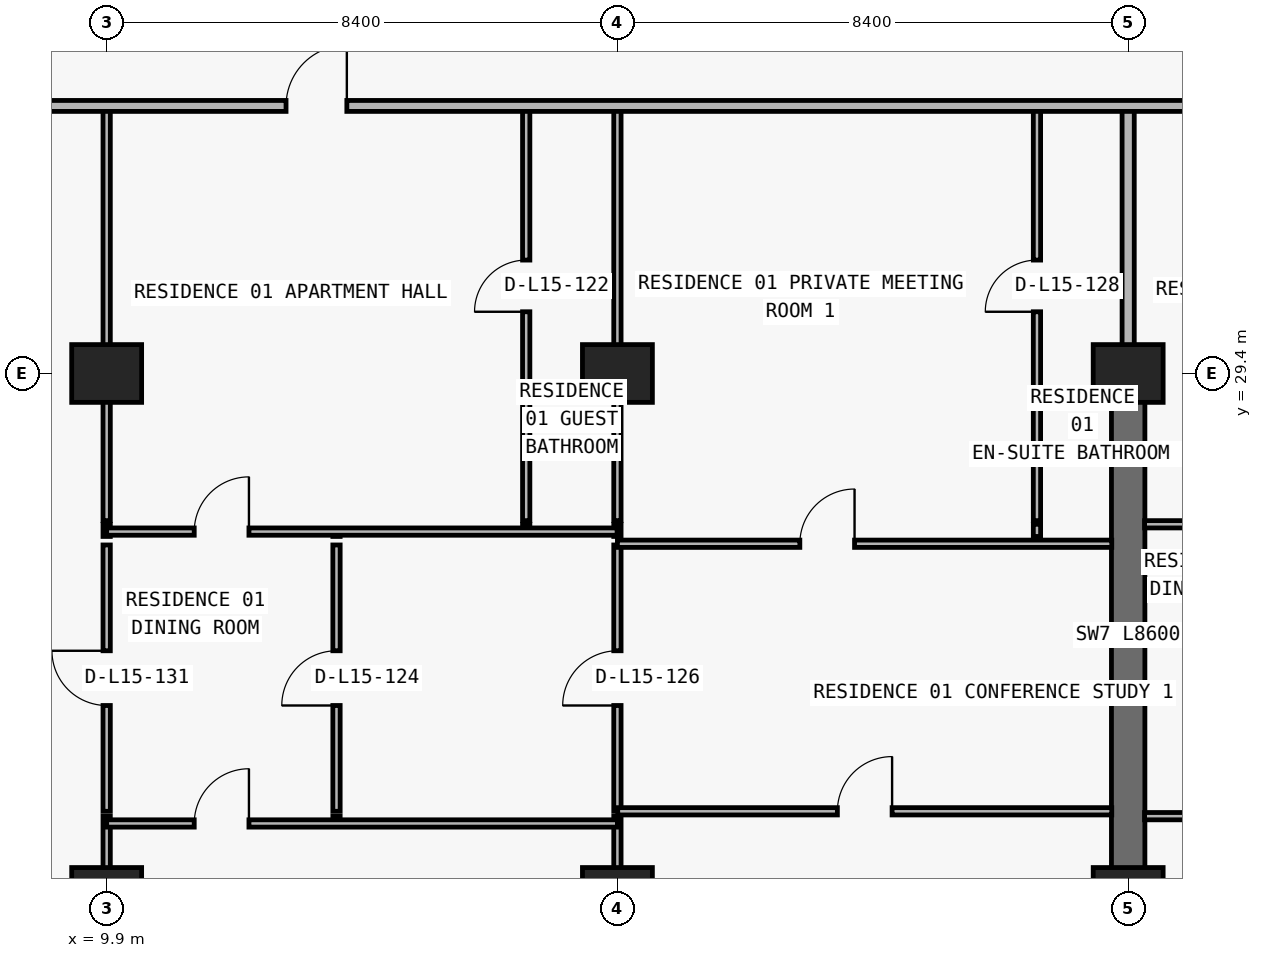
"""IFC4 building model, lengths in metres.
Left out: names, types, materials, properties, quantities, classifications, styles, units other than length and angle.
Written with IfcOpenShell. Run it as: python <this file> out.ifc"""

import sys

from ifc_helpers import new_model, si_unit, direction, frame, frame_2d, origin, origin_2d, place, context, subcontext, project, spatial, rectangle, extrude, element, fill, save


model = new_model("IFC4")
c1 = context("Model", 3, precision=1e-05, world=origin(), true_north=direction((0.0, 1.0)))
c2 = subcontext(c1, "Body", "Model", "MODEL_VIEW")
j1 = project(units=[si_unit("LENGTHUNIT", "METRE"), si_unit("PLANEANGLEUNIT", "RADIAN")], contexts=[c1])
p1 = place(None, origin())
s1 = spatial("IfcSite", under=j1, at=p1, CompositionType="ELEMENT")
p2 = place(p1, origin())
s2 = spatial("IfcBuilding", under=s1, at=p2, CompositionType="ELEMENT")
p3 = place(p2, frame((0.0, 0.0, 59.7)))
s3 = spatial("IfcBuildingStorey", under=s2, at=p3, CompositionType="ELEMENT", Elevation=59.7)
for number, where, z_axis, x_axis in (
    (1, (9.9, 20.8, 0.0), (0.0, 0.0, 1.0), (1.0, 0.0, 0.0)),
    (2, (18.3, 20.8, 0.0), (0.0, 0.0, 1.0), (1.0, 0.0, 0.0)),
    (3, (26.7, 20.8, 0.0), (0.0, 0.0, 1.0), (1.0, 0.0, 0.0)),
    (4, (9.9, 29.4, 0.0), (0.0, 0.0, 1.0), (1.0, 0.0, 0.0)),
    (5, (18.3, 29.4, 0.0), (0.0, 0.0, 1.0), (1.0, 0.0, 0.0)),
    (6, (26.7, 29.4, 0.0), (0.0, 0.0, 1.0), (1.0, 0.0, 0.0)),
):
    element("IfcColumn", number, at=place(p3, frame(where, z_axis=z_axis, x_axis=x_axis)), inside=s3, PredefinedType="COLUMN", context=c2, shape_type="SweptSolid", body=[
        extrude(rectangle(XDim=1.15, YDim=0.95, at=origin_2d()), origin(), (0.0, 0.0, 1.0), 3.05),
    ])
p4 = place(p3, frame((26.7, 20.8, 0.0), z_axis=(0.0, 0.0, 1.0), x_axis=(0.0, 1.0, 0.0)))
e7 = element("IfcWall", 7, at=p4, inside=s3, PredefinedType="SHEAR", context=c2, shape_type="SweptSolid", body=[
    extrude(rectangle(XDim=8.6, YDim=0.55, at=frame_2d((4.3, 0.0))), origin(), (0.0, 0.0, 1.0), 3.05),
])
p5 = place(p3, frame((9.9, 6.24, 0.0), z_axis=(0.0, 0.0, 1.0), x_axis=(0.0, 1.0, 0.0)))
e8 = element("IfcWall", 8, at=p5, inside=s3, PredefinedType="PARTITIONING", context=c2, shape_type="SweptSolid", body=[
    extrude(rectangle(XDim=15.88, YDim=0.12, at=frame_2d((7.94, 0.0))), origin(), (0.0, 0.0, 1.0), 2.11),
])
p6 = place(p3, frame((9.9, 22.2, 0.0), z_axis=(0.0, 0.0, 1.0), x_axis=(0.0, 1.0, 0.0)))
e9 = element("IfcWall", 9, at=p6, inside=s3, PredefinedType="PARTITIONING", context=c2, shape_type="SweptSolid", body=[
    extrude(rectangle(XDim=4.38, YDim=0.12, at=frame_2d((2.19, 0.0))), origin(), (0.0, 0.0, 1.0), 2.11),
])
p7 = place(p6, frame((1.74, 0.0, 0.0)))
e10 = element("IfcOpeningElement", 10, at=p7, cuts=e9, PredefinedType="OPENING", context=c2, shape_type="SweptSolid", body=[
    extrude(rectangle(XDim=0.9, YDim=2.06, at=frame_2d((0.45, 1.03))), frame((0.0, 0.07, 0.0), z_axis=(0.0, -1.0, 0.0), x_axis=(1.0, 0.0, 0.0)), (0.0, 0.0, 1.0), 0.14),
])
p8 = place(p3, frame((9.9, 26.72, 0.0), z_axis=(0.0, 0.0, 1.0), x_axis=(0.0, 1.0, 0.0)))
e11 = element("IfcWall", 11, at=p8, inside=s3, PredefinedType="PARTITIONING", context=c2, shape_type="SweptSolid", body=[
    extrude(rectangle(XDim=0.2, YDim=0.12, at=frame_2d((0.1, 0.0))), origin(), (0.0, 0.0, 1.0), 2.11),
])
p9 = place(p3, frame((9.9, 26.98, 0.0), z_axis=(0.0, 0.0, 1.0), x_axis=(0.0, 1.0, 0.0)))
e12 = element("IfcWall", 12, at=p9, inside=s3, PredefinedType="PARTITIONING", context=c2, shape_type="SweptSolid", body=[
    extrude(rectangle(XDim=6.82, YDim=0.12, at=frame_2d((3.41, 0.0))), origin(), (0.0, 0.0, 1.0), 2.11),
])
p10 = place(p3, frame((13.68, 22.0, 0.0), z_axis=(0.0, 0.0, 1.0), x_axis=(0.0, 1.0, 0.0)))
e13 = element("IfcWall", 13, at=p10, inside=s3, PredefinedType="PARTITIONING", context=c2, shape_type="SweptSolid", body=[
    extrude(rectangle(XDim=0.12, YDim=0.12, at=frame_2d((0.06, 0.0))), origin(), (0.0, 0.0, 1.0), 3.05),
])
p11 = place(p3, frame((13.68, 22.2, 0.0), z_axis=(0.0, 0.0, 1.0), x_axis=(0.0, 1.0, 0.0)))
e14 = element("IfcWall", 14, at=p11, inside=s3, PredefinedType="PARTITIONING", context=c2, shape_type="SweptSolid", body=[
    extrude(rectangle(XDim=4.38, YDim=0.12, at=frame_2d((2.19, 0.0))), origin(), (0.0, 0.0, 1.0), 3.05),
])
p12 = place(p11, frame((1.74, 0.0, 0.0)))
e15 = element("IfcOpeningElement", 15, at=p12, cuts=e14, PredefinedType="OPENING", context=c2, shape_type="SweptSolid", body=[
    extrude(rectangle(XDim=0.9, YDim=2.15, at=frame_2d((0.45, 1.075))), frame((0.0, 0.07, 0.0), z_axis=(0.0, -1.0, 0.0), x_axis=(1.0, 0.0, 0.0)), (0.0, 0.0, 1.0), 0.14),
])
p13 = place(p3, frame((13.68, 26.72, 0.0), z_axis=(0.0, 0.0, 1.0), x_axis=(0.0, 1.0, 0.0)))
e16 = element("IfcWall", 16, at=p13, inside=s3, PredefinedType="PARTITIONING", context=c2, shape_type="SweptSolid", body=[
    extrude(rectangle(XDim=0.08, YDim=0.12, at=frame_2d((0.04, 0.0))), origin(), (0.0, 0.0, 1.0), 3.05),
])
p14 = place(p3, frame((16.8, 26.8, 0.0), z_axis=(0.0, 0.0, 1.0), x_axis=(0.0, 1.0, 0.0)))
e17 = element("IfcWall", 17, at=p14, inside=s3, PredefinedType="PARTITIONING", context=c2, shape_type="SweptSolid", body=[
    extrude(rectangle(XDim=0.12, YDim=0.12, at=frame_2d((0.06, 0.0))), origin(), (0.0, 0.0, 1.0), 3.05),
])
p15 = place(p3, frame((16.8, 26.98, 0.0), z_axis=(0.0, 0.0, 1.0), x_axis=(0.0, 1.0, 0.0)))
e18 = element("IfcWall", 18, at=p15, inside=s3, PredefinedType="PARTITIONING", context=c2, shape_type="SweptSolid", body=[
    extrude(rectangle(XDim=6.82, YDim=0.12, at=frame_2d((3.41, 0.0))), origin(), (0.0, 0.0, 1.0), 3.05),
])
p16 = place(p15, frame((3.435, 0.0, 0.0)))
e19 = element("IfcOpeningElement", 19, at=p16, cuts=e18, PredefinedType="OPENING", context=c2, shape_type="SweptSolid", body=[
    extrude(rectangle(XDim=0.85, YDim=2.1, at=frame_2d((0.425, 1.05))), frame((0.0, 0.07, 0.0), z_axis=(0.0, -1.0, 0.0), x_axis=(1.0, 0.0, 0.0)), (0.0, 0.0, 1.0), 0.14),
])
p17 = place(p3, frame((18.3, 6.24, 0.0), z_axis=(0.0, 0.0, 1.0), x_axis=(0.0, 1.0, 0.0)))
e20 = element("IfcWall", 20, at=p17, inside=s3, PredefinedType="PARTITIONING", context=c2, shape_type="SweptSolid", body=[
    extrude(rectangle(XDim=15.88, YDim=0.12, at=frame_2d((7.94, 0.0))), origin(), (0.0, 0.0, 1.0), 2.11),
])
p18 = place(p3, frame((18.3, 22.2, 0.0), z_axis=(0.0, 0.0, 1.0), x_axis=(0.0, 1.0, 0.0)))
e21 = element("IfcWall", 21, at=p18, inside=s3, PredefinedType="PARTITIONING", context=c2, shape_type="SweptSolid", body=[
    extrude(rectangle(XDim=4.38, YDim=0.12, at=frame_2d((2.19, 0.0))), origin(), (0.0, 0.0, 1.0), 2.11),
])
p19 = place(p18, frame((1.74, 0.0, 0.0)))
e22 = element("IfcOpeningElement", 22, at=p19, cuts=e21, PredefinedType="OPENING", context=c2, shape_type="SweptSolid", body=[
    extrude(rectangle(XDim=0.9, YDim=2.06, at=frame_2d((0.45, 1.03))), frame((0.0, 0.07, 0.0), z_axis=(0.0, -1.0, 0.0), x_axis=(1.0, 0.0, 0.0)), (0.0, 0.0, 1.0), 0.14),
])
p20 = place(p3, frame((18.3, 26.72, 0.0), z_axis=(0.0, 0.0, 1.0), x_axis=(0.0, 1.0, 0.0)))
e23 = element("IfcWall", 23, at=p20, inside=s3, PredefinedType="PARTITIONING", context=c2, shape_type="SweptSolid", body=[
    extrude(rectangle(XDim=0.2, YDim=0.12, at=frame_2d((0.1, 0.0))), origin(), (0.0, 0.0, 1.0), 2.11),
])
p21 = place(p3, frame((18.3, 26.98, 0.0), z_axis=(0.0, 0.0, 1.0), x_axis=(0.0, 1.0, 0.0)))
e24 = element("IfcWall", 24, at=p21, inside=s3, PredefinedType="PARTITIONING", context=c2, shape_type="SweptSolid", body=[
    extrude(rectangle(XDim=6.82, YDim=0.12, at=frame_2d((3.41, 0.0))), origin(), (0.0, 0.0, 1.0), 2.11),
])
p22 = place(p3, frame((25.2, 26.72, 0.0), z_axis=(0.0, 0.0, 1.0), x_axis=(0.0, 1.0, 0.0)))
e25 = element("IfcWall", 25, at=p22, inside=s3, PredefinedType="PARTITIONING", context=c2, shape_type="SweptSolid", body=[
    extrude(rectangle(XDim=0.2, YDim=0.12, at=frame_2d((0.1, 0.0))), origin(), (0.0, 0.0, 1.0), 3.05),
])
p23 = place(p3, frame((25.2, 26.98, 0.0), z_axis=(0.0, 0.0, 1.0), x_axis=(0.0, 1.0, 0.0)))
e26 = element("IfcWall", 26, at=p23, inside=s3, PredefinedType="PARTITIONING", context=c2, shape_type="SweptSolid", body=[
    extrude(rectangle(XDim=6.82, YDim=0.12, at=frame_2d((3.41, 0.0))), origin(), (0.0, 0.0, 1.0), 3.05),
])
p24 = place(p23, frame((3.435, 0.0, 0.0)))
e27 = element("IfcOpeningElement", 27, at=p24, cuts=e26, PredefinedType="OPENING", context=c2, shape_type="SweptSolid", body=[
    extrude(rectangle(XDim=0.85, YDim=2.1, at=frame_2d((0.425, 1.05))), frame((0.0, 0.07, 0.0), z_axis=(0.0, -1.0, 0.0), x_axis=(1.0, 0.0, 0.0)), (0.0, 0.0, 1.0), 0.14),
])
p25 = place(p3, frame((26.7, 29.405, 0.0), z_axis=(0.0, 0.0, 1.0), x_axis=(0.0, 1.0, 0.0)))
e28 = element("IfcWall", 28, at=p25, inside=s3, PredefinedType="PARTITIONING", context=c2, shape_type="SweptSolid", body=[
    extrude(rectangle(XDim=4.395, YDim=0.2, at=frame_2d((2.198, 0.0))), origin(), (0.0, 0.0, 1.0), 2.335),
])
p26 = place(p3, frame((9.9, 22.0, 0.0), z_axis=(0.0, 0.0, 1.0), x_axis=(1.0, 0.0, 0.0)))
e29 = element("IfcWall", 29, at=p26, inside=s3, PredefinedType="PARTITIONING", context=c2, shape_type="SweptSolid", body=[
    extrude(rectangle(XDim=8.4, YDim=0.12, at=frame_2d((4.2, 0.0))), origin(), (0.0, 0.0, 1.0), 3.05),
])
p27 = place(p26, frame((1.44, 0.0, 0.0)))
e30 = element("IfcOpeningElement", 30, at=p27, cuts=e29, PredefinedType="OPENING", context=c2, shape_type="SweptSolid", body=[
    extrude(rectangle(XDim=0.9, YDim=2.15, at=frame_2d((0.45, 1.075))), frame((0.0, 0.07, 0.0), z_axis=(0.0, -1.0, 0.0), x_axis=(1.0, 0.0, 0.0)), (0.0, 0.0, 1.0), 0.14),
])
p28 = place(p3, frame((26.97, 22.12, 0.0), z_axis=(0.0, 0.0, 1.0), x_axis=(1.0, 0.0, 0.0)))
e31 = element("IfcWall", 31, at=p28, inside=s3, PredefinedType="PARTITIONING", context=c2, shape_type="SweptSolid", body=[
    extrude(rectangle(XDim=8.13, YDim=0.12, at=frame_2d((4.065, 0.0))), origin(), (0.0, 0.0, 1.0), 3.05),
])
p29 = place(p28, frame((1.179, 0.0, 0.0)))
e32 = element("IfcOpeningElement", 32, at=p29, cuts=e31, PredefinedType="OPENING", context=c2, shape_type="SweptSolid", body=[
    extrude(rectangle(XDim=0.9, YDim=2.15, at=frame_2d((0.45, 1.075))), frame((0.0, 0.07, 0.0), z_axis=(0.0, -1.0, 0.0), x_axis=(1.0, 0.0, 0.0)), (0.0, 0.0, 1.0), 0.14),
])
p30 = place(p3, frame((18.305, 22.2, 0.0), z_axis=(0.0, 0.0, 1.0), x_axis=(1.0, 0.0, 0.0)))
e33 = element("IfcWall", 33, at=p30, inside=s3, PredefinedType="PARTITIONING", context=c2, shape_type="SweptSolid", body=[
    extrude(rectangle(XDim=8.125, YDim=0.12, at=frame_2d((4.062, 0.0))), origin(), (0.0, 0.0, 1.0), 3.05),
])
p31 = place(p30, frame((3.613, 0.0, 0.0)))
e34 = element("IfcOpeningElement", 34, at=p31, cuts=e33, PredefinedType="OPENING", context=c2, shape_type="SweptSolid", body=[
    extrude(rectangle(XDim=0.9, YDim=2.15, at=frame_2d((0.45, 1.075))), frame((0.0, 0.07, 0.0), z_axis=(0.0, -1.0, 0.0), x_axis=(1.0, 0.0, 0.0)), (0.0, 0.0, 1.0), 0.14),
])
p32 = place(p3, frame((18.3, 26.6, 0.0), z_axis=(0.0, 0.0, 1.0), x_axis=(1.0, 0.0, 0.0)))
e35 = element("IfcWall", 35, at=p32, inside=s3, PredefinedType="PARTITIONING", context=c2, shape_type="SweptSolid", body=[
    extrude(rectangle(XDim=8.13, YDim=0.12, at=frame_2d((4.065, 0.0))), origin(), (0.0, 0.0, 1.0), 3.05),
])
p33 = place(p32, frame((3.0, 0.0, 0.0)))
e36 = element("IfcOpeningElement", 36, at=p33, cuts=e35, PredefinedType="OPENING", context=c2, shape_type="SweptSolid", body=[
    extrude(rectangle(XDim=0.9, YDim=2.15, at=frame_2d((0.45, 1.075))), frame((0.0, 0.07, 0.0), z_axis=(0.0, -1.0, 0.0), x_axis=(1.0, 0.0, 0.0)), (0.0, 0.0, 1.0), 0.14),
])
p34 = place(p3, frame((9.9, 26.8, 0.0), z_axis=(0.0, 0.0, 1.0), x_axis=(1.0, 0.0, 0.0)))
e37 = element("IfcWall", 37, at=p34, inside=s3, PredefinedType="PARTITIONING", context=c2, shape_type="SweptSolid", body=[
    extrude(rectangle(XDim=8.395, YDim=0.12, at=frame_2d((4.198, 0.0))), origin(), (0.0, 0.0, 1.0), 3.05),
])
p35 = place(p34, frame((1.44, 0.0, 0.0)))
e38 = element("IfcOpeningElement", 38, at=p35, cuts=e37, PredefinedType="OPENING", context=c2, shape_type="SweptSolid", body=[
    extrude(rectangle(XDim=0.9, YDim=2.15, at=frame_2d((0.45, 1.075))), frame((0.0, 0.07, 0.0), z_axis=(0.0, -1.0, 0.0), x_axis=(1.0, 0.0, 0.0)), (0.0, 0.0, 1.0), 0.14),
])
p36 = place(p3, frame((26.97, 26.92, 0.0), z_axis=(0.0, 0.0, 1.0), x_axis=(1.0, 0.0, 0.0)))
e39 = element("IfcWall", 39, at=p36, inside=s3, PredefinedType="PARTITIONING", context=c2, shape_type="SweptSolid", body=[
    extrude(rectangle(XDim=8.13, YDim=0.12, at=frame_2d((4.065, 0.0))), origin(), (0.0, 0.0, 1.0), 3.05),
])
p37 = place(p36, frame((1.179, 0.0, 0.0)))
e40 = element("IfcOpeningElement", 40, at=p37, cuts=e39, PredefinedType="OPENING", context=c2, shape_type="SweptSolid", body=[
    extrude(rectangle(XDim=0.9, YDim=2.15, at=frame_2d((0.45, 1.075))), frame((0.0, 0.07, 0.0), z_axis=(0.0, -1.0, 0.0), x_axis=(1.0, 0.0, 0.0)), (0.0, 0.0, 1.0), 0.14),
])
p38 = place(p3, frame((5.105, 33.8, 0.0), z_axis=(0.0, 0.0, 1.0), x_axis=(1.0, 0.0, 0.0)))
e41 = element("IfcWall", 41, at=p38, inside=s3, PredefinedType="PARTITIONING", context=c2, shape_type="SweptSolid", body=[
    extrude(rectangle(XDim=67.595, YDim=0.18, at=frame_2d((33.797, 0.0))), origin(), (0.0, 0.0, 1.0), 3.05),
])
p39 = place(p38, frame((7.745, 0.0, 0.0)))
e42 = element("IfcOpeningElement", 42, at=p39, cuts=e41, PredefinedType="OPENING", context=c2, shape_type="SweptSolid", body=[
    extrude(rectangle(XDim=1.0, YDim=2.2, at=frame_2d((0.5, 1.1))), frame((0.0, 0.1, 0.0), z_axis=(0.0, -1.0, 0.0), x_axis=(1.0, 0.0, 0.0)), (0.0, 0.0, 1.0), 0.2),
])
p40 = place(p38, frame((24.545, 0.0, 0.0)))
e43 = element("IfcOpeningElement", 43, at=p40, cuts=e41, PredefinedType="OPENING", context=c2, shape_type="SweptSolid", body=[
    extrude(rectangle(XDim=1.0, YDim=2.2, at=frame_2d((0.5, 1.1))), frame((0.0, 0.1, 0.0), z_axis=(0.0, -1.0, 0.0), x_axis=(1.0, 0.0, 0.0)), (0.0, 0.0, 1.0), 0.2),
])
p41 = place(p38, frame((40.47, 0.0, 0.0)))
e44 = element("IfcOpeningElement", 44, at=p41, cuts=e41, PredefinedType="OPENING", context=c2, shape_type="SweptSolid", body=[
    extrude(rectangle(XDim=1.0, YDim=2.2, at=frame_2d((0.5, 1.1))), frame((0.0, 0.1, 0.0), z_axis=(0.0, -1.0, 0.0), x_axis=(1.0, 0.0, 0.0)), (0.0, 0.0, 1.0), 0.2),
])
p42 = place(p38, frame((48.87, 0.0, 0.0)))
e45 = element("IfcOpeningElement", 45, at=p42, cuts=e41, PredefinedType="OPENING", context=c2, shape_type="SweptSolid", body=[
    extrude(rectangle(XDim=1.0, YDim=2.2, at=frame_2d((0.5, 1.1))), frame((0.0, 0.1, 0.0), z_axis=(0.0, -1.0, 0.0), x_axis=(1.0, 0.0, 0.0)), (0.0, 0.0, 1.0), 0.2),
])
p43 = place(p38, frame((57.27, 0.0, 0.0)))
e46 = element("IfcOpeningElement", 46, at=p43, cuts=e41, PredefinedType="OPENING", context=c2, shape_type="SweptSolid", body=[
    extrude(rectangle(XDim=1.0, YDim=2.2, at=frame_2d((0.5, 1.1))), frame((0.0, 0.1, 0.0), z_axis=(0.0, -1.0, 0.0), x_axis=(1.0, 0.0, 0.0)), (0.0, 0.0, 1.0), 0.2),
])
p44 = place(p39, origin())
e47 = element("IfcDoor", 47, at=p44, inside=s3, OperationType="SINGLE_SWING_RIGHT", PredefinedType="DOOR", context=c2, shape_type="SweptSolid", body=[
    extrude(rectangle(XDim=1.0, YDim=2.2, at=frame_2d((0.5, 1.1))), frame((0.0, 0.025, 0.0), z_axis=(0.0, -1.0, 0.0), x_axis=(1.0, 0.0, 0.0)), (0.0, 0.0, 1.0), 0.05),
])
fill(e42, e47)
p45 = place(p16, origin())
e48 = element("IfcDoor", 48, at=p45, inside=s3, OperationType="SINGLE_SWING_LEFT", PredefinedType="DOOR", context=c2, shape_type="SweptSolid", body=[
    extrude(rectangle(XDim=0.85, YDim=2.1, at=frame_2d((0.425, 1.05))), frame((0.0, 0.025, 0.0), z_axis=(0.0, -1.0, 0.0), x_axis=(1.0, 0.0, 0.0)), (0.0, 0.0, 1.0), 0.05),
])
fill(e19, e48)
p46 = place(p35, origin())
e49 = element("IfcDoor", 49, at=p46, inside=s3, OperationType="SINGLE_SWING_RIGHT", PredefinedType="DOOR", context=c2, shape_type="SweptSolid", body=[
    extrude(rectangle(XDim=0.9, YDim=2.15, at=frame_2d((0.45, 1.075))), frame((0.0, 0.025, 0.0), z_axis=(0.0, -1.0, 0.0), x_axis=(1.0, 0.0, 0.0)), (0.0, 0.0, 1.0), 0.05),
])
fill(e38, e49)
p47 = place(p12, origin())
e50 = element("IfcDoor", 50, at=p47, inside=s3, OperationType="SINGLE_SWING_LEFT", PredefinedType="DOOR", context=c2, shape_type="SweptSolid", body=[
    extrude(rectangle(XDim=0.9, YDim=2.15, at=frame_2d((0.45, 1.075))), frame((0.0, 0.025, 0.0), z_axis=(0.0, -1.0, 0.0), x_axis=(1.0, 0.0, 0.0)), (0.0, 0.0, 1.0), 0.05),
])
fill(e15, e50)
p48 = place(p27, origin())
e51 = element("IfcDoor", 51, at=p48, inside=s3, OperationType="SINGLE_SWING_RIGHT", PredefinedType="DOOR", context=c2, shape_type="SweptSolid", body=[
    extrude(rectangle(XDim=0.9, YDim=2.15, at=frame_2d((0.45, 1.075))), frame((0.0, 0.025, 0.0), z_axis=(0.0, -1.0, 0.0), x_axis=(1.0, 0.0, 0.0)), (0.0, 0.0, 1.0), 0.05),
])
fill(e30, e51)
p49 = place(p19, origin())
e52 = element("IfcDoor", 52, at=p49, inside=s3, OperationType="SINGLE_SWING_LEFT", PredefinedType="DOOR", context=c2, shape_type="SweptSolid", body=[
    extrude(rectangle(XDim=0.9, YDim=2.06, at=frame_2d((0.45, 1.03))), frame((0.0, 0.025, 0.0), z_axis=(0.0, -1.0, 0.0), x_axis=(1.0, 0.0, 0.0)), (0.0, 0.0, 1.0), 0.05),
])
fill(e22, e52)
p50 = place(p33, origin())
e53 = element("IfcDoor", 53, at=p50, inside=s3, OperationType="SINGLE_SWING_RIGHT", PredefinedType="DOOR", context=c2, shape_type="SweptSolid", body=[
    extrude(rectangle(XDim=0.9, YDim=2.15, at=frame_2d((0.45, 1.075))), frame((0.0, 0.025, 0.0), z_axis=(0.0, -1.0, 0.0), x_axis=(1.0, 0.0, 0.0)), (0.0, 0.0, 1.0), 0.05),
])
fill(e36, e53)
p51 = place(p24, origin())
e54 = element("IfcDoor", 54, at=p51, inside=s3, OperationType="SINGLE_SWING_LEFT", PredefinedType="DOOR", context=c2, shape_type="SweptSolid", body=[
    extrude(rectangle(XDim=0.85, YDim=2.1, at=frame_2d((0.425, 1.05))), frame((0.0, 0.025, 0.0), z_axis=(0.0, -1.0, 0.0), x_axis=(1.0, 0.0, 0.0)), (0.0, 0.0, 1.0), 0.05),
])
fill(e27, e54)
p52 = place(p31, origin())
e55 = element("IfcDoor", 55, at=p52, inside=s3, OperationType="SINGLE_SWING_RIGHT", PredefinedType="DOOR", context=c2, shape_type="SweptSolid", body=[
    extrude(rectangle(XDim=0.9, YDim=2.15, at=frame_2d((0.45, 1.075))), frame((0.0, 0.025, 0.0), z_axis=(0.0, -1.0, 0.0), x_axis=(1.0, 0.0, 0.0)), (0.0, 0.0, 1.0), 0.05),
])
fill(e34, e55)
p53 = place(p7, origin())
e56 = element("IfcDoor", 56, at=p53, inside=s3, OperationType="SINGLE_SWING_RIGHT", PredefinedType="DOOR", context=c2, shape_type="SweptSolid", body=[
    extrude(rectangle(XDim=0.9, YDim=2.06, at=frame_2d((0.45, 1.03))), frame((0.0, 0.025, 0.0), z_axis=(0.0, -1.0, 0.0), x_axis=(1.0, 0.0, 0.0)), (0.0, 0.0, 1.0), 0.05),
])
fill(e10, e56)
save(model, sys.argv[1])
